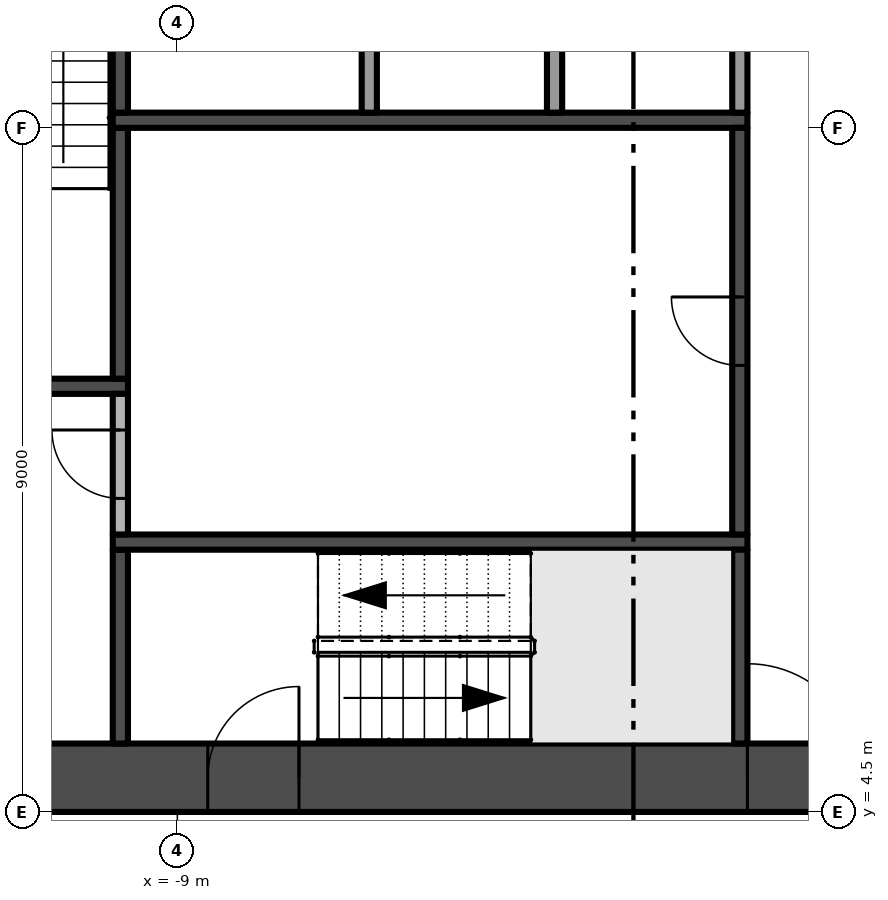
"""IFC4 building model, lengths in metres.
Left out: names, types, materials, properties, quantities, classifications, styles, units other than length and angle.
Written with IfcOpenShell. Run it as: python <this file> out.ifc"""

import sys

from ifc_helpers import new_model, si_unit, direction, frame, frame_2d, origin, place, context, subcontext, project, spatial, rectangle, extrude, element, fill, save


model = new_model("IFC4")
c1 = context("Model", 3, precision=1e-05, world=origin(), true_north=direction((0.0, 1.0)))
c2 = subcontext(c1, "Body", "Model", "MODEL_VIEW")
j1 = project(units=[si_unit("LENGTHUNIT", "METRE"), si_unit("PLANEANGLEUNIT", "RADIAN")], contexts=[c1])
p1 = place(None, origin())
s1 = spatial("IfcSite", under=j1, at=p1, CompositionType="ELEMENT")
p2 = place(p1, origin())
s2 = spatial("IfcBuilding", under=s1, at=p2, CompositionType="ELEMENT")
p3 = place(p2, frame((0.0, 0.0, 30.2)))
s3 = spatial("IfcBuildingStorey", under=s2, at=p3, CompositionType="ELEMENT", Elevation=30.2)
p4 = place(p3, frame((-13.5, 4.95, -0.3), z_axis=(0.0, 0.0, 1.0), x_axis=(1.0, 0.0, 0.0)))
e1 = element("IfcWall", 1, at=p4, inside=s3, PredefinedType="SHEAR", context=c2, shape_type="SweptSolid", body=[
    extrude(rectangle(XDim=27.0, YDim=0.9, at=frame_2d((13.5, 0.0))), origin(), (0.0, 0.0, 1.0), 3.8),
])
p5 = place(p4, frame((12.0, 0.0, 0.3)))
e2 = element("IfcOpeningElement", 2, at=p5, cuts=e1, PredefinedType="OPENING", context=c2, shape_type="SweptSolid", body=[
    extrude(rectangle(XDim=3.0, YDim=2.4, at=frame_2d((1.5, 1.2))), frame((0.0, 0.46, 0.0), z_axis=(0.0, -1.0, 0.0), x_axis=(1.0, 0.0, 0.0)), (0.0, 0.0, 1.0), 0.92),
])
p6 = place(p4, frame((4.9, 0.0, 0.3)))
e3 = element("IfcOpeningElement", 3, at=p6, cuts=e1, PredefinedType="OPENING", context=c2, shape_type="SweptSolid", body=[
    extrude(rectangle(XDim=1.2, YDim=2.2, at=frame_2d((0.6, 1.1))), frame((0.0, 0.46, 0.0), z_axis=(0.0, -1.0, 0.0), x_axis=(1.0, 0.0, 0.0)), (0.0, 0.0, 1.0), 0.92),
])
p7 = place(p4, frame((20.75, 0.0, 0.3)))
e4 = element("IfcOpeningElement", 4, at=p7, cuts=e1, PredefinedType="OPENING", context=c2, shape_type="SweptSolid", body=[
    extrude(rectangle(XDim=1.5, YDim=2.2, at=frame_2d((0.75, 1.1))), frame((0.0, 0.46, 0.0), z_axis=(0.0, -1.0, 0.0), x_axis=(1.0, 0.0, 0.0)), (0.0, 0.0, 1.0), 0.92),
])
p8 = place(p4, frame((17.4, 0.0, 0.3)))
e5 = element("IfcOpeningElement", 5, at=p8, cuts=e1, PredefinedType="OPENING", context=c2, shape_type="SweptSolid", body=[
    extrude(rectangle(XDim=1.2, YDim=2.2, at=frame_2d((0.6, 1.1))), frame((0.0, 0.46, 0.0), z_axis=(0.0, -1.0, 0.0), x_axis=(1.0, 0.0, 0.0)), (0.0, 0.0, 1.0), 0.92),
])
p9 = place(p3, frame((-12.6, 10.1, 0.0), z_axis=(0.0, 0.0, 1.0), x_axis=(1.0, 0.0, 0.0)))
e6 = element("IfcWall", 6, at=p9, inside=s3, PredefinedType="SHEAR", context=c2, shape_type="SweptSolid", body=[
    extrude(rectangle(XDim=2.95, YDim=0.2, at=frame_2d((1.475, 0.0))), origin(), (0.0, 0.0, 1.0), 3.5),
])
p10 = place(p3, frame((-9.75, 5.4, 0.0), z_axis=(0.0, 0.0, 1.0), x_axis=(0.0, 1.0, 0.0)))
e7 = element("IfcWall", 7, at=p10, inside=s3, PredefinedType="SHEAR", context=c2, shape_type="SweptSolid", body=[
    extrude(rectangle(XDim=2.55, YDim=0.2, at=frame_2d((1.275, 0.0))), origin(), (0.0, 0.0, 1.0), 3.5),
])
p11 = place(p3, frame((-9.85, 8.05, 0.0), z_axis=(0.0, 0.0, 1.0), x_axis=(1.0, 0.0, 0.0)))
e8 = element("IfcWall", 8, at=p11, inside=s3, PredefinedType="SHEAR", context=c2, shape_type="SweptSolid", body=[
    extrude(rectangle(XDim=8.35, YDim=0.2, at=frame_2d((4.175, 0.0))), origin(), (0.0, 0.0, 1.0), 3.5),
])
p12 = place(p3, frame((-9.75, 8.15, 0.0), z_axis=(0.0, 0.0, 1.0), x_axis=(0.0, 1.0, 0.0)))
e9 = element("IfcWall", 9, at=p12, inside=s3, PredefinedType="PARTITIONING", context=c2, shape_type="SweptSolid", body=[
    extrude(rectangle(XDim=1.85, YDim=0.2, at=frame_2d((0.925, 0.0))), origin(), (0.0, 0.0, 1.0), 3.5),
])
p13 = place(p12, frame((0.475, 0.0, 0.0)))
e10 = element("IfcOpeningElement", 10, at=p13, cuts=e9, PredefinedType="OPENING", context=c2, shape_type="SweptSolid", body=[
    extrude(rectangle(XDim=0.9, YDim=2.1, at=frame_2d((0.45, 1.05))), frame((0.0, 0.11, 0.0), z_axis=(0.0, -1.0, 0.0), x_axis=(1.0, 0.0, 0.0)), (0.0, 0.0, 1.0), 0.22),
])
p14 = place(p3, frame((-9.75, 10.2, 0.0), z_axis=(0.0, 0.0, 1.0), x_axis=(0.0, 1.0, 0.0)))
e11 = element("IfcWall", 11, at=p14, inside=s3, PredefinedType="SHEAR", context=c2, shape_type="SweptSolid", body=[
    extrude(rectangle(XDim=3.3, YDim=0.2, at=frame_2d((1.65, 0.0))), origin(), (0.0, 0.0, 1.0), 3.5),
])
p15 = place(p3, frame((-9.85, 13.6, 0.0), z_axis=(0.0, 0.0, 1.0), x_axis=(1.0, 0.0, 0.0)))
e12 = element("IfcWall", 12, at=p15, inside=s3, PredefinedType="SHEAR", context=c2, shape_type="SweptSolid", body=[
    extrude(rectangle(XDim=8.35, YDim=0.2, at=frame_2d((4.175, 0.0))), origin(), (0.0, 0.0, 1.0), 3.5),
])
p16 = place(p3, frame((-9.75, 13.7, 0.0), z_axis=(0.0, 0.0, 1.0), x_axis=(0.0, 1.0, 0.0)))
e13 = element("IfcWall", 13, at=p16, inside=s3, PredefinedType="SHEAR", context=c2, shape_type="SweptSolid", body=[
    extrude(rectangle(XDim=2.2, YDim=0.2, at=frame_2d((1.1, 0.0))), origin(), (0.0, 0.0, 1.0), 3.5),
])
for number, where, z_axis, x_axis in (
    (14, (-6.475, 13.7, 0.0), (0.0, 0.0, 1.0), (0.0, 1.0, 0.0)),
    (15, (-4.037, 13.7, 0.0), (0.0, 0.0, 1.0), (0.0, 1.0, 0.0)),
):
    element("IfcWall", number, at=place(p3, frame(where, z_axis=z_axis, x_axis=x_axis)), inside=s3, PredefinedType="PARTITIONING", context=c2, shape_type="SweptSolid", body=[
        extrude(rectangle(XDim=2.2, YDim=0.2, at=frame_2d((1.1, 0.0))), origin(), (0.0, 0.0, 1.0), 3.5),
    ])
p17 = place(p3, frame((-1.6, 5.4, 0.0), z_axis=(0.0, 0.0, 1.0), x_axis=(0.0, 1.0, 0.0)))
e16 = element("IfcWall", 16, at=p17, inside=s3, PredefinedType="SHEAR", context=c2, shape_type="SweptSolid", body=[
    extrude(rectangle(XDim=2.55, YDim=0.2, at=frame_2d((1.275, 0.0))), origin(), (0.0, 0.0, 1.0), 3.5),
])
p18 = place(p3, frame((-1.6, 8.15, 0.0), z_axis=(0.0, 0.0, 1.0), x_axis=(0.0, 1.0, 0.0)))
e17 = element("IfcWall", 17, at=p18, inside=s3, PredefinedType="SHEAR", context=c2, shape_type="SweptSolid", body=[
    extrude(rectangle(XDim=5.35, YDim=0.2, at=frame_2d((2.675, 0.0))), origin(), (0.0, 0.0, 1.0), 3.5),
])
p19 = place(p18, frame((2.225, 0.0, 0.0)))
e18 = element("IfcOpeningElement", 18, at=p19, cuts=e17, PredefinedType="OPENING", context=c2, shape_type="SweptSolid", body=[
    extrude(rectangle(XDim=0.9, YDim=2.1, at=frame_2d((0.45, 1.05))), frame((0.0, 0.11, 0.0), z_axis=(0.0, -1.0, 0.0), x_axis=(1.0, 0.0, 0.0)), (0.0, 0.0, 1.0), 0.22),
])
p20 = place(p3, frame((-1.6, 13.7, 0.0), z_axis=(0.0, 0.0, 1.0), x_axis=(0.0, 1.0, 0.0)))
e19 = element("IfcWall", 19, at=p20, inside=s3, PredefinedType="PARTITIONING", context=c2, shape_type="SweptSolid", body=[
    extrude(rectangle(XDim=2.2, YDim=0.2, at=frame_2d((1.1, 0.0))), origin(), (0.0, 0.0, 1.0), 3.5),
])
p21 = place(p5, frame((3.0, 0.0, 0.0), z_axis=(0.0, 0.0, 1.0), x_axis=(-1.0, 0.0, 0.0)))
e20 = element("IfcDoor", 20, at=p21, inside=s3, OperationType="DOUBLE_DOOR_SINGLE_SWING", PredefinedType="DOOR", context=c2, shape_type="SweptSolid", body=[
    extrude(rectangle(XDim=3.0, YDim=2.4, at=frame_2d((1.5, 1.2))), frame((0.0, 0.025, 0.0), z_axis=(0.0, -1.0, 0.0), x_axis=(1.0, 0.0, 0.0)), (0.0, 0.0, 1.0), 0.05),
])
fill(e2, e20)
p22 = place(p6, frame((1.2, 0.0, 0.0), z_axis=(0.0, 0.0, 1.0), x_axis=(-1.0, 0.0, 0.0)))
e21 = element("IfcDoor", 21, at=p22, inside=s3, OperationType="SINGLE_SWING_LEFT", PredefinedType="DOOR", context=c2, shape_type="SweptSolid", body=[
    extrude(rectangle(XDim=1.2, YDim=2.2, at=frame_2d((0.6, 1.1))), frame((0.0, 0.025, 0.0), z_axis=(0.0, -1.0, 0.0), x_axis=(1.0, 0.0, 0.0)), (0.0, 0.0, 1.0), 0.05),
])
fill(e3, e21)
p23 = place(p19, origin())
e22 = element("IfcDoor", 22, at=p23, inside=s3, OperationType="SINGLE_SWING_RIGHT", PredefinedType="DOOR", context=c2, shape_type="SweptSolid", body=[
    extrude(rectangle(XDim=0.9, YDim=2.1, at=frame_2d((0.45, 1.05))), frame((0.0, 0.025, 0.0), z_axis=(0.0, -1.0, 0.0), x_axis=(1.0, 0.0, 0.0)), (0.0, 0.0, 1.0), 0.05),
])
fill(e18, e22)
p24 = place(p13, origin())
e23 = element("IfcDoor", 23, at=p24, inside=s3, OperationType="SINGLE_SWING_RIGHT", PredefinedType="DOOR", context=c2, shape_type="SweptSolid", body=[
    extrude(rectangle(XDim=0.9, YDim=2.1, at=frame_2d((0.45, 1.05))), frame((0.0, 0.025, 0.0), z_axis=(0.0, -1.0, 0.0), x_axis=(1.0, 0.0, 0.0)), (0.0, 0.0, 1.0), 0.05),
])
fill(e10, e23)
save(model, sys.argv[1])
